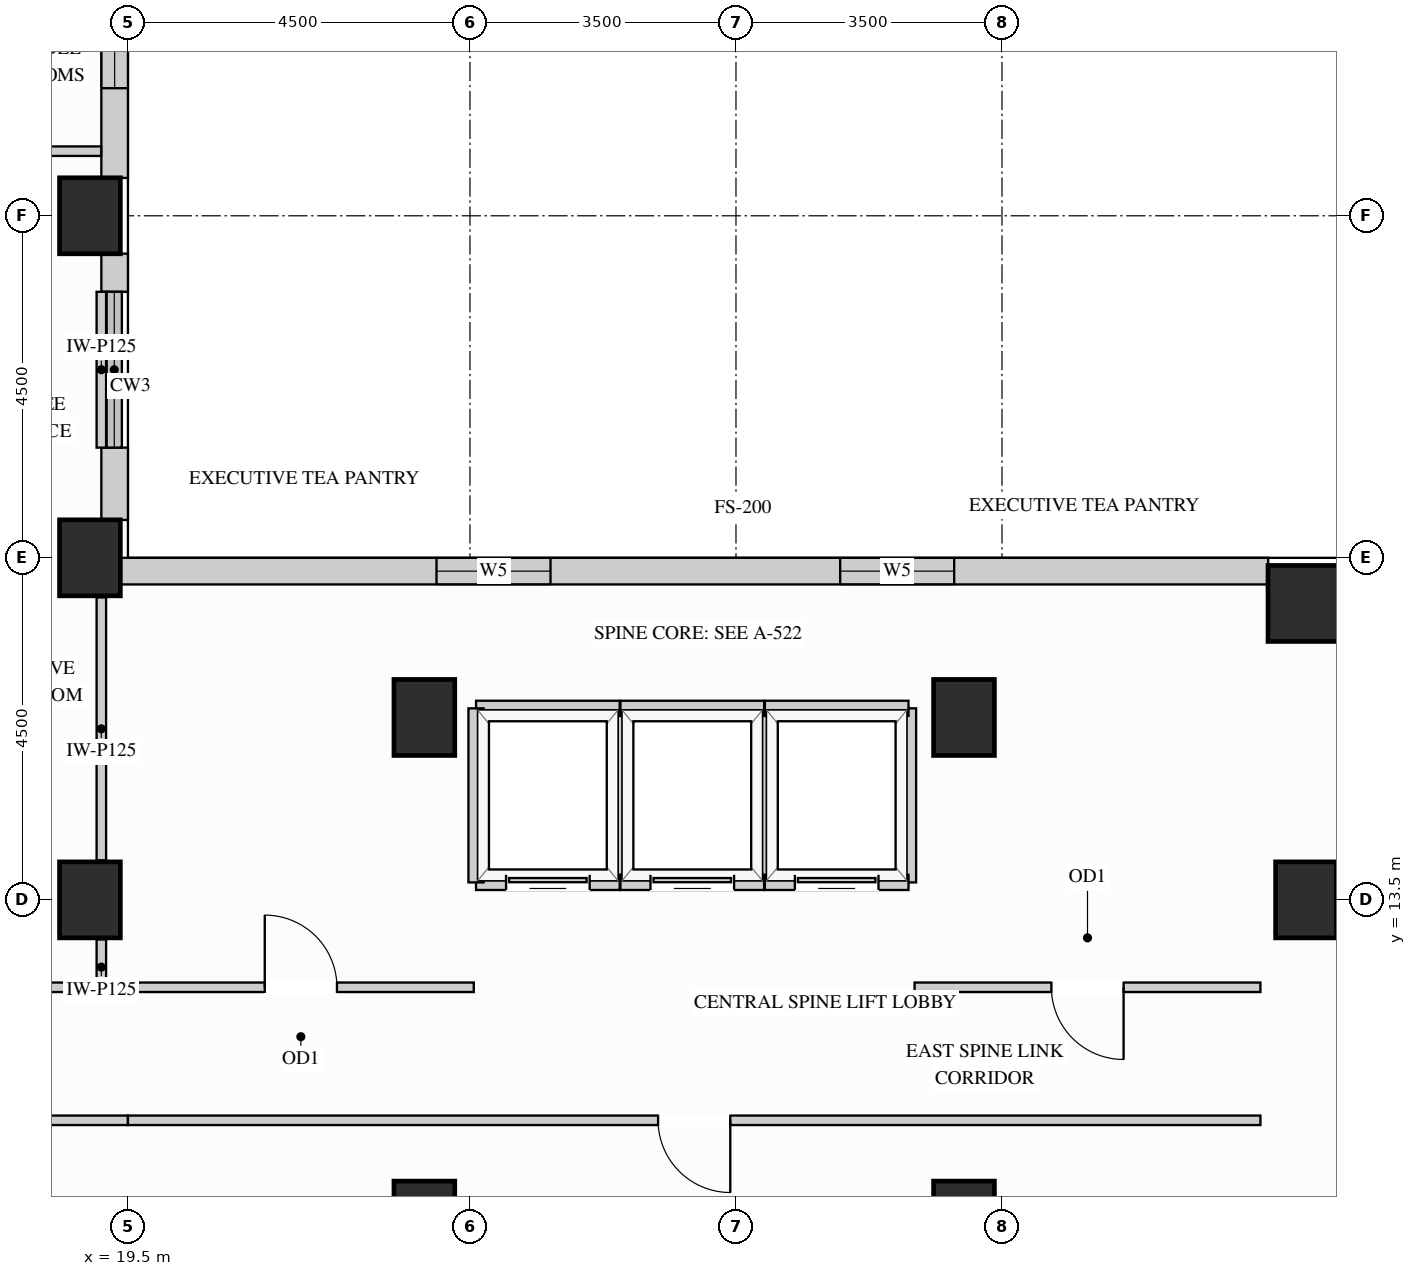
"""IFC4 building model, lengths in metres.
Left out: names, types, materials, properties, quantities, classifications, styles, units other than length and angle.
Written with IfcOpenShell. Run it as: python <this file> out.ifc"""

import sys

from ifc_helpers import new_model, si_unit, direction, frame, frame_2d, origin, origin_2d, place, context, subcontext, project, spatial, rectangle, extrude, source, transform, mapped, element, fill, save


model = new_model("IFC4")
c1 = context("Model", 3, precision=1e-05, world=origin(), true_north=direction((0.0, 1.0)))
c2 = subcontext(c1, "Body", "Model", "MODEL_VIEW")
j1 = project(units=[si_unit("LENGTHUNIT", "METRE"), si_unit("PLANEANGLEUNIT", "RADIAN")], contexts=[c1])
p1 = place(None, origin())
s1 = spatial("IfcSite", under=j1, at=p1, CompositionType="ELEMENT")
p2 = place(p1, origin())
s2 = spatial("IfcBuilding", under=s1, at=p2, CompositionType="ELEMENT")
p3 = place(p2, frame((0.0, 0.0, 153.9)))
s3 = spatial("IfcBuildingStorey", under=s2, at=p3, CompositionType="ELEMENT", Elevation=153.9)
m1 = source(origin(), c2, "Body", "SweptSolid", [
    extrude(rectangle(XDim=0.8, YDim=1.0, at=origin_2d()), origin(), (0.0, 0.0, 1.0), 3.4),
])
for number, where, z_axis, x_axis in (
    (1, (19.0, 13.5, 0.0), (0.0, 0.0, 1.0), (1.0, 0.0, 0.0)),
    (2, (19.0, 18.0, 0.0), (0.0, 0.0, 1.0), (1.0, 0.0, 0.0)),
    (3, (19.0, 22.5, 0.0), (0.0, 0.0, 1.0), (1.0, 0.0, 0.0)),
    (4, (35.0, 13.5, 0.0), (0.0, 0.0, 1.0), (1.0, 0.0, 0.0)),
    (5, (23.4, 15.9, 0.0), (0.0, 0.0, 1.0), (1.0, 0.0, 0.0)),
    (6, (23.4, 9.3, 0.0), (0.0, 0.0, 1.0), (1.0, 0.0, 0.0)),
    (7, (30.5, 15.9, 0.0), (0.0, 0.0, 1.0), (1.0, 0.0, 0.0)),
    (8, (30.5, 9.3, 0.0), (0.0, 0.0, 1.0), (1.0, 0.0, 0.0)),
):
    element("IfcColumn", number, at=place(p3, frame(where, z_axis=z_axis, x_axis=x_axis)), inside=s3, PredefinedType="COLUMN", context=c2, shape_type="MappedRepresentation", body=[
        mapped(m1, transform((0.0, 0.0, 0.0), x_axis=(1.0, 0.0, 0.0), y_axis=(0.0, 1.0, 0.0), z_axis=(0.0, 0.0, 1.0))),
    ])
m2 = source(origin(), c2, "Body", "SweptSolid", [
    extrude(rectangle(XDim=1.0, YDim=1.0, at=origin_2d()), origin(), (0.0, 0.0, 1.0), 3.4),
])
p4 = place(p3, frame((35.0, 17.4, 0.0), z_axis=(0.0, 0.0, 1.0), x_axis=(1.0, 0.0, 0.0)))
e9 = element("IfcColumn", 9, at=p4, inside=s3, PredefinedType="COLUMN", context=c2, shape_type="MappedRepresentation", body=[
    mapped(m2, transform((0.0, 0.0, 0.0), x_axis=(1.0, 0.0, 0.0), y_axis=(0.0, 1.0, 0.0), z_axis=(0.0, 0.0, 1.0))),
])
p5 = place(p3, frame((34.502, 17.825, 0.0), z_axis=(0.0, 0.0, 1.0), x_axis=(-1.0, 0.0, 0.0)))
e10 = element("IfcWall", 10, at=p5, inside=s3, PredefinedType="SOLIDWALL", context=c2, shape_type="SweptSolid", body=[
    extrude(rectangle(XDim=15.104, YDim=0.35, at=frame_2d((7.552, 0.0))), origin(), (0.0, 0.0, 1.0), 3.385),
])
p6 = place(p5, frame((4.131, 0.0, 0.78)))
e11 = element("IfcOpeningElement", 11, at=p6, cuts=e10, PredefinedType="OPENING", context=c2, shape_type="SweptSolid", body=[
    extrude(rectangle(XDim=1.5, YDim=2.0, at=frame_2d((0.75, 1.0))), frame((0.0, 0.185, 0.0), z_axis=(0.0, -1.0, 0.0), x_axis=(1.0, 0.0, 0.0)), (0.0, 0.0, 1.0), 0.37),
])
p7 = place(p5, frame((9.442, 0.0, 0.78)))
e12 = element("IfcOpeningElement", 12, at=p7, cuts=e10, PredefinedType="OPENING", context=c2, shape_type="SweptSolid", body=[
    extrude(rectangle(XDim=1.5, YDim=2.0, at=frame_2d((0.75, 1.0))), frame((0.0, 0.185, 0.0), z_axis=(0.0, -1.0, 0.0), x_axis=(1.0, 0.0, 0.0)), (0.0, 0.0, 1.0), 0.37),
])
m3 = source(origin(), c2, "Body", "SweptSolid", [
    extrude(rectangle(XDim=0.952, YDim=0.35, at=frame_2d((0.476, 0.0))), origin(), (0.0, 0.0, 1.0), 2.612),
])
p8 = place(p3, frame((19.325, 18.498, 0.0), z_axis=(0.0, 0.0, 1.0), x_axis=(0.0, 1.0, 0.0)))
e13 = element("IfcWall", 13, at=p8, inside=s3, PredefinedType="SOLIDWALL", context=c2, shape_type="MappedRepresentation", body=[
    mapped(m3, transform((0.0, 0.0, 0.0), x_axis=(1.0, 0.0, 0.0), y_axis=(0.0, 1.0, 0.0), z_axis=(0.0, 0.0, 1.0))),
])
m4 = source(origin(), c2, "Body", "SweptSolid", [
    extrude(rectangle(XDim=0.502, YDim=0.35, at=frame_2d((0.251, 0.0))), origin(), (0.0, 0.0, 1.0), 2.612),
])
p9 = place(p3, frame((19.325, 21.5, 0.0), z_axis=(0.0, 0.0, 1.0), x_axis=(0.0, 1.0, 0.0)))
e14 = element("IfcWall", 14, at=p9, inside=s3, PredefinedType="SOLIDWALL", context=c2, shape_type="MappedRepresentation", body=[
    mapped(m4, transform((0.0, 0.0, 0.0), x_axis=(1.0, 0.0, 0.0), y_axis=(0.0, 1.0, 0.0), z_axis=(0.0, 0.0, 1.0))),
])
p10 = place(p3, frame((19.325, 22.998, 0.0), z_axis=(0.0, 0.0, 1.0), x_axis=(0.0, 1.0, 0.0)))
e15 = element("IfcWall", 15, at=p10, inside=s3, PredefinedType="SOLIDWALL", context=c2, shape_type="SweptSolid", body=[
    extrude(rectangle(XDim=3.304, YDim=0.35, at=frame_2d((1.652, 0.0))), origin(), (0.0, 0.0, 1.0), 2.612),
])
p11 = place(p10, frame((1.18, 0.0, 0.78)))
e16 = element("IfcOpeningElement", 16, at=p11, cuts=e15, PredefinedType="OPENING", context=c2, shape_type="SweptSolid", body=[
    extrude(rectangle(XDim=1.5, YDim=1.652, at=frame_2d((0.75, 0.826))), frame((0.0, 0.185, 0.0), z_axis=(0.0, -1.0, 0.0), x_axis=(1.0, 0.0, 0.0)), (0.0, 0.0, 1.0), 0.37),
])
m5 = source(origin(), c2, "Body", "SweptSolid", [
    extrude(rectangle(XDim=2.598, YDim=0.125, at=frame_2d((1.299, 0.0))), origin(), (0.0, 0.0, 1.0), 3.385),
])
p12 = place(p3, frame((16.55, 23.35, 0.0), z_axis=(0.0, 0.0, 1.0), x_axis=(1.0, 0.0, 0.0)))
e17 = element("IfcWall", 17, at=p12, inside=s3, PredefinedType="PARTITIONING", context=c2, shape_type="MappedRepresentation", body=[
    mapped(m5, transform((0.0, 0.0, 0.0), x_axis=(1.0, 0.0, 0.0), y_axis=(0.0, 1.0, 0.0), z_axis=(0.0, 0.0, 1.0))),
])
m6 = source(origin(), c2, "Body", "SweptSolid", [
    extrude(rectangle(XDim=0.63, YDim=0.125, at=frame_2d((0.315, 0.0))), origin(), (0.0, 0.0, 1.0), 2.773),
])
p13 = place(p3, frame((19.15, 12.35, 0.0), z_axis=(0.0, 0.0, 1.0), x_axis=(0.0, 1.0, 0.0)))
e18 = element("IfcWall", 18, at=p13, inside=s3, PredefinedType="PARTITIONING", context=c2, shape_type="MappedRepresentation", body=[
    mapped(m6, transform((0.0, 0.0, 0.0), x_axis=(1.0, 0.0, 0.0), y_axis=(0.0, 1.0, 0.0), z_axis=(0.0, 0.0, 1.0))),
])
m7 = source(origin(), c2, "Body", "SweptSolid", [
    extrude(rectangle(XDim=3.46, YDim=0.125, at=frame_2d((1.73, 0.0))), origin(), (0.0, 0.0, 1.0), 2.773),
])
p14 = place(p3, frame((19.15, 14.02, 0.0), z_axis=(0.0, 0.0, 1.0), x_axis=(0.0, 1.0, 0.0)))
e19 = element("IfcWall", 19, at=p14, inside=s3, PredefinedType="PARTITIONING", context=c2, shape_type="MappedRepresentation", body=[
    mapped(m7, transform((0.0, 0.0, 0.0), x_axis=(1.0, 0.0, 0.0), y_axis=(0.0, 1.0, 0.0), z_axis=(0.0, 0.0, 1.0))),
])
m8 = source(origin(), c2, "Body", "SweptSolid", [
    extrude(rectangle(XDim=2.05, YDim=0.125, at=frame_2d((1.025, 0.0))), origin(), (0.0, 0.0, 1.0), 2.612),
])
p15 = place(p3, frame((19.15, 19.45, 0.0), z_axis=(0.0, 0.0, 1.0), x_axis=(0.0, 1.0, 0.0)))
e20 = element("IfcWall", 20, at=p15, inside=s3, PredefinedType="PARTITIONING", context=c2, shape_type="MappedRepresentation", body=[
    mapped(m8, transform((0.0, 0.0, 0.0), x_axis=(1.0, 0.0, 0.0), y_axis=(0.0, 1.0, 0.0), z_axis=(0.0, 0.0, 1.0))),
])
p16 = place(p3, frame((29.85, 12.35, 0.0), z_axis=(0.0, 0.0, 1.0), x_axis=(1.0, 0.0, 0.0)))
e21 = element("IfcWall", 21, at=p16, inside=s3, PredefinedType="PARTITIONING", context=c2, shape_type="SweptSolid", body=[
    extrude(rectangle(XDim=4.55, YDim=0.125, at=frame_2d((2.275, 0.0))), origin(), (0.0, 0.0, 1.0), 3.385),
])
p17 = place(p16, frame((1.8, 0.0, 0.0)))
e22 = element("IfcOpeningElement", 22, at=p17, cuts=e21, PredefinedType="OPENING", context=c2, shape_type="SweptSolid", body=[
    extrude(rectangle(XDim=0.95, YDim=2.15, at=frame_2d((0.475, 1.075))), frame((0.0, 0.073, 0.0), z_axis=(0.0, -1.0, 0.0), x_axis=(1.0, 0.0, 0.0)), (0.0, 0.0, 1.0), 0.145),
])
m9 = source(origin(), c2, "Body", "SweptSolid", [
    extrude(rectangle(XDim=2.95, YDim=0.125, at=frame_2d((1.475, 0.0))), origin(), (0.0, 0.0, 1.0), 3.385),
])
p18 = place(p3, frame((16.55, 12.35, 0.0), z_axis=(0.0, 0.0, 1.0), x_axis=(1.0, 0.0, 0.0)))
e23 = element("IfcWall", 23, at=p18, inside=s3, PredefinedType="PARTITIONING", context=c2, shape_type="MappedRepresentation", body=[
    mapped(m9, transform((0.0, 0.0, 0.0), x_axis=(1.0, 0.0, 0.0), y_axis=(0.0, 1.0, 0.0), z_axis=(0.0, 0.0, 1.0))),
])
p19 = place(p3, frame((19.5, 12.35, 0.0), z_axis=(0.0, 0.0, 1.0), x_axis=(1.0, 0.0, 0.0)))
e24 = element("IfcWall", 24, at=p19, inside=s3, PredefinedType="PARTITIONING", context=c2, shape_type="SweptSolid", body=[
    extrude(rectangle(XDim=4.55, YDim=0.125, at=frame_2d((2.275, 0.0))), origin(), (0.0, 0.0, 1.0), 3.385),
])
p20 = place(p19, frame((1.8, 0.0, 0.0)))
e25 = element("IfcOpeningElement", 25, at=p20, cuts=e24, PredefinedType="OPENING", context=c2, shape_type="SweptSolid", body=[
    extrude(rectangle(XDim=0.95, YDim=2.15, at=frame_2d((0.475, 1.075))), frame((0.0, 0.073, 0.0), z_axis=(0.0, -1.0, 0.0), x_axis=(1.0, 0.0, 0.0)), (0.0, 0.0, 1.0), 0.145),
])
p21 = place(p3, frame((16.55, 10.6, 0.0), z_axis=(0.0, 0.0, 1.0), x_axis=(1.0, 0.0, 0.0)))
e26 = element("IfcWall", 26, at=p21, inside=s3, PredefinedType="PARTITIONING", context=c2, shape_type="MappedRepresentation", body=[
    mapped(m9, transform((0.0, 0.0, 0.0), x_axis=(1.0, 0.0, 0.0), y_axis=(0.0, 1.0, 0.0), z_axis=(0.0, 0.0, 1.0))),
])
p22 = place(p3, frame((19.5, 10.6, 0.0), z_axis=(0.0, 0.0, 1.0), x_axis=(1.0, 0.0, 0.0)))
e27 = element("IfcWall", 27, at=p22, inside=s3, PredefinedType="PARTITIONING", context=c2, shape_type="SweptSolid", body=[
    extrude(rectangle(XDim=14.9, YDim=0.125, at=frame_2d((7.45, 0.0))), origin(), (0.0, 0.0, 1.0), 3.385),
])
p23 = place(p22, frame((6.975, 0.0, 0.0)))
e28 = element("IfcOpeningElement", 28, at=p23, cuts=e27, PredefinedType="OPENING", context=c2, shape_type="SweptSolid", body=[
    extrude(rectangle(XDim=0.95, YDim=2.15, at=frame_2d((0.475, 1.075))), frame((0.0, 0.073, 0.0), z_axis=(0.0, -1.0, 0.0), x_axis=(1.0, 0.0, 0.0)), (0.0, 0.0, 1.0), 0.145),
])
m10 = source(origin(), c2, "Body", "SweptSolid", [
    extrude(rectangle(XDim=2.29, YDim=0.2, at=frame_2d((1.145, 0.0))), origin(), (0.0, 0.0, 1.0), 3.385),
])
p24 = place(p3, frame((25.97, 13.73, 0.0), z_axis=(0.0, 0.0, 1.0), x_axis=(0.0, 1.0, 0.0)))
e29 = element("IfcWall", 29, at=p24, inside=s3, PredefinedType="PARTITIONING", context=c2, shape_type="MappedRepresentation", body=[
    mapped(m10, transform((0.0, 0.0, 0.0), x_axis=(1.0, 0.0, 0.0), y_axis=(0.0, 1.0, 0.0), z_axis=(0.0, 0.0, 1.0))),
])
m11 = source(origin(), c2, "Body", "SweptSolid", [
    extrude(rectangle(XDim=1.89, YDim=0.2, at=frame_2d((0.945, 0.0))), origin(), (0.0, 0.0, 1.0), 2.773),
])
p25 = place(p3, frame((24.08, 16.02, 0.0), z_axis=(0.0, 0.0, 1.0), x_axis=(1.0, 0.0, 0.0)))
e30 = element("IfcWall", 30, at=p25, inside=s3, PredefinedType="PARTITIONING", context=c2, shape_type="MappedRepresentation", body=[
    mapped(m11, transform((0.0, 0.0, 0.0), x_axis=(1.0, 0.0, 0.0), y_axis=(0.0, 1.0, 0.0), z_axis=(0.0, 0.0, 1.0))),
])
p26 = place(p3, frame((24.08, 13.73, 0.0), z_axis=(0.0, 0.0, 1.0), x_axis=(1.0, 0.0, 0.0)))
e31 = element("IfcWall", 31, at=p26, inside=s3, PredefinedType="PARTITIONING", context=c2, shape_type="SweptSolid", body=[
    extrude(rectangle(XDim=1.89, YDim=0.2, at=frame_2d((0.945, 0.0))), origin(), (0.0, 0.0, 1.0), 2.466),
])
p27 = place(p26, frame((0.395, 0.0, 0.0)))
e32 = element("IfcOpeningElement", 32, at=p27, cuts=e31, PredefinedType="OPENING", context=c2, shape_type="SweptSolid", body=[
    extrude(rectangle(XDim=1.1, YDim=2.2, at=frame_2d((0.55, 1.1))), frame((0.0, 0.11, 0.0), z_axis=(0.0, -1.0, 0.0), x_axis=(1.0, 0.0, 0.0)), (0.0, 0.0, 1.0), 0.22),
])
for number, where, z_axis, x_axis in (
    (33, (24.08, 13.73, 0.0), (0.0, 0.0, 1.0), (0.0, 1.0, 0.0)),
    (34, (27.87, 13.73, 0.0), (0.0, 0.0, 1.0), (0.0, 1.0, 0.0)),
):
    element("IfcWall", number, at=place(p3, frame(where, z_axis=z_axis, x_axis=x_axis)), inside=s3, PredefinedType="PARTITIONING", context=c2, shape_type="MappedRepresentation", body=[
        mapped(m10, transform((0.0, 0.0, 0.0), x_axis=(1.0, 0.0, 0.0), y_axis=(0.0, 1.0, 0.0), z_axis=(0.0, 0.0, 1.0))),
    ])
m12 = source(origin(), c2, "Body", "SweptSolid", [
    extrude(rectangle(XDim=1.89, YDim=0.2, at=frame_2d((0.945, 0.0))), origin(), (0.0, 0.0, 1.0), 2.773),
])
p28 = place(p3, frame((25.98, 16.02, 0.0), z_axis=(0.0, 0.0, 1.0), x_axis=(1.0, 0.0, 0.0)))
e35 = element("IfcWall", 35, at=p28, inside=s3, PredefinedType="PARTITIONING", context=c2, shape_type="MappedRepresentation", body=[
    mapped(m12, transform((0.0, 0.0, 0.0), x_axis=(1.0, 0.0, 0.0), y_axis=(0.0, 1.0, 0.0), z_axis=(0.0, 0.0, 1.0))),
])
p29 = place(p3, frame((25.98, 13.73, 0.0), z_axis=(0.0, 0.0, 1.0), x_axis=(1.0, 0.0, 0.0)))
e36 = element("IfcWall", 36, at=p29, inside=s3, PredefinedType="PARTITIONING", context=c2, shape_type="SweptSolid", body=[
    extrude(rectangle(XDim=1.89, YDim=0.2, at=frame_2d((0.945, 0.0))), origin(), (0.0, 0.0, 1.0), 2.466),
])
p30 = place(p29, frame((0.395, 0.0, 0.0)))
e37 = element("IfcOpeningElement", 37, at=p30, cuts=e36, PredefinedType="OPENING", context=c2, shape_type="SweptSolid", body=[
    extrude(rectangle(XDim=1.1, YDim=2.2, at=frame_2d((0.55, 1.1))), frame((0.0, 0.11, 0.0), z_axis=(0.0, -1.0, 0.0), x_axis=(1.0, 0.0, 0.0)), (0.0, 0.0, 1.0), 0.22),
])
p31 = place(p3, frame((29.77, 13.73, 0.0), z_axis=(0.0, 0.0, 1.0), x_axis=(0.0, 1.0, 0.0)))
e38 = element("IfcWall", 38, at=p31, inside=s3, PredefinedType="PARTITIONING", context=c2, shape_type="MappedRepresentation", body=[
    mapped(m10, transform((0.0, 0.0, 0.0), x_axis=(1.0, 0.0, 0.0), y_axis=(0.0, 1.0, 0.0), z_axis=(0.0, 0.0, 1.0))),
])
p32 = place(p3, frame((27.88, 16.02, 0.0), z_axis=(0.0, 0.0, 1.0), x_axis=(1.0, 0.0, 0.0)))
e39 = element("IfcWall", 39, at=p32, inside=s3, PredefinedType="PARTITIONING", context=c2, shape_type="MappedRepresentation", body=[
    mapped(m12, transform((0.0, 0.0, 0.0), x_axis=(1.0, 0.0, 0.0), y_axis=(0.0, 1.0, 0.0), z_axis=(0.0, 0.0, 1.0))),
])
p33 = place(p3, frame((27.88, 13.73, 0.0), z_axis=(0.0, 0.0, 1.0), x_axis=(1.0, 0.0, 0.0)))
e40 = element("IfcWall", 40, at=p33, inside=s3, PredefinedType="PARTITIONING", context=c2, shape_type="SweptSolid", body=[
    extrude(rectangle(XDim=1.89, YDim=0.2, at=frame_2d((0.945, 0.0))), origin(), (0.0, 0.0, 1.0), 2.466),
])
p34 = place(p33, frame((0.395, 0.0, 0.0)))
e41 = element("IfcOpeningElement", 41, at=p34, cuts=e40, PredefinedType="OPENING", context=c2, shape_type="SweptSolid", body=[
    extrude(rectangle(XDim=1.1, YDim=2.2, at=frame_2d((0.55, 1.1))), frame((0.0, 0.11, 0.0), z_axis=(0.0, -1.0, 0.0), x_axis=(1.0, 0.0, 0.0)), (0.0, 0.0, 1.0), 0.22),
])
m13 = source(origin(), c2, "Body", "SweptSolid", [
    extrude(rectangle(XDim=1.1, YDim=2.2, at=frame_2d((0.55, 1.1))), frame((0.0, 0.025, 0.0), z_axis=(0.0, -1.0, 0.0), x_axis=(1.0, 0.0, 0.0)), (0.0, 0.0, 1.0), 0.05),
])
p35 = place(p27, origin())
e42 = element("IfcDoor", 42, at=p35, inside=s3, OperationType="SLIDING_TO_LEFT", PredefinedType="DOOR", context=c2, shape_type="MappedRepresentation", body=[
    mapped(m13, transform((0.0, 0.0, 0.0), x_axis=(1.0, 0.0, 0.0), y_axis=(0.0, 1.0, 0.0), z_axis=(0.0, 0.0, 1.0))),
])
fill(e32, e42)
p36 = place(p30, origin())
e43 = element("IfcDoor", 43, at=p36, inside=s3, OperationType="SLIDING_TO_LEFT", PredefinedType="DOOR", context=c2, shape_type="MappedRepresentation", body=[
    mapped(m13, transform((0.0, 0.0, 0.0), x_axis=(1.0, 0.0, 0.0), y_axis=(0.0, 1.0, 0.0), z_axis=(0.0, 0.0, 1.0))),
])
fill(e37, e43)
p37 = place(p34, origin())
e44 = element("IfcDoor", 44, at=p37, inside=s3, OperationType="SLIDING_TO_LEFT", PredefinedType="DOOR", context=c2, shape_type="MappedRepresentation", body=[
    mapped(m13, transform((0.0, 0.0, 0.0), x_axis=(1.0, 0.0, 0.0), y_axis=(0.0, 1.0, 0.0), z_axis=(0.0, 0.0, 1.0))),
])
fill(e41, e44)
m14 = source(origin(), c2, "Body", "SweptSolid", [
    extrude(rectangle(XDim=0.95, YDim=2.15, at=frame_2d((0.475, 1.075))), frame((0.0, 0.025, 0.0), z_axis=(0.0, -1.0, 0.0), x_axis=(1.0, 0.0, 0.0)), (0.0, 0.0, 1.0), 0.05),
])
p38 = place(p20, origin())
e45 = element("IfcDoor", 45, at=p38, inside=s3, OperationType="SINGLE_SWING_LEFT", PredefinedType="DOOR", context=c2, shape_type="MappedRepresentation", body=[
    mapped(m14, transform((0.0, 0.0, 0.0), x_axis=(1.0, 0.0, 0.0), y_axis=(0.0, 1.0, 0.0), z_axis=(0.0, 0.0, 1.0))),
])
fill(e25, e45)
p39 = place(p17, origin())
e46 = element("IfcDoor", 46, at=p39, inside=s3, OperationType="SINGLE_SWING_RIGHT", PredefinedType="DOOR", context=c2, shape_type="MappedRepresentation", body=[
    mapped(m14, transform((0.0, 0.0, 0.0), x_axis=(1.0, 0.0, 0.0), y_axis=(0.0, 1.0, 0.0), z_axis=(0.0, 0.0, 1.0))),
])
fill(e22, e46)
p40 = place(p23, origin())
e47 = element("IfcDoor", 47, at=p40, inside=s3, OperationType="SINGLE_SWING_RIGHT", PredefinedType="DOOR", context=c2, shape_type="MappedRepresentation", body=[
    mapped(m14, transform((0.0, 0.0, 0.0), x_axis=(1.0, 0.0, 0.0), y_axis=(0.0, 1.0, 0.0), z_axis=(0.0, 0.0, 1.0))),
])
fill(e28, e47)
m15 = source(origin(), c2, "Body", "SweptSolid", [
    extrude(rectangle(XDim=1.5, YDim=2.0, at=frame_2d((0.75, 1.0))), frame((0.0, 0.03, 0.0), z_axis=(0.0, -1.0, 0.0), x_axis=(1.0, 0.0, 0.0)), (0.0, 0.0, 1.0), 0.06),
])
p41 = place(p6, origin())
e48 = element("IfcWindow", 48, at=p41, inside=s3, PartitioningType="SINGLE_PANEL", PredefinedType="WINDOW", context=c2, shape_type="MappedRepresentation", body=[
    mapped(m15, transform((0.0, 0.0, 0.0), x_axis=(1.0, 0.0, 0.0), y_axis=(0.0, 1.0, 0.0), z_axis=(0.0, 0.0, 1.0))),
])
fill(e11, e48)
p42 = place(p7, origin())
e49 = element("IfcWindow", 49, at=p42, inside=s3, PartitioningType="SINGLE_PANEL", PredefinedType="WINDOW", context=c2, shape_type="MappedRepresentation", body=[
    mapped(m15, transform((0.0, 0.0, 0.0), x_axis=(1.0, 0.0, 0.0), y_axis=(0.0, 1.0, 0.0), z_axis=(0.0, 0.0, 1.0))),
])
fill(e12, e49)
m16 = source(origin(), c2, "Body", "SweptSolid", [
    extrude(rectangle(XDim=1.5, YDim=1.652, at=frame_2d((0.75, 0.826))), frame((0.0, 0.03, 0.0), z_axis=(0.0, -1.0, 0.0), x_axis=(1.0, 0.0, 0.0)), (0.0, 0.0, 1.0), 0.06),
])
p43 = place(p11, origin())
e50 = element("IfcWindow", 50, at=p43, inside=s3, PartitioningType="SINGLE_PANEL", PredefinedType="WINDOW", context=c2, shape_type="MappedRepresentation", body=[
    mapped(m16, transform((0.0, 0.0, 0.0), x_axis=(1.0, 0.0, 0.0), y_axis=(0.0, 1.0, 0.0), z_axis=(0.0, 0.0, 1.0))),
])
fill(e16, e50)
save(model, sys.argv[1])
